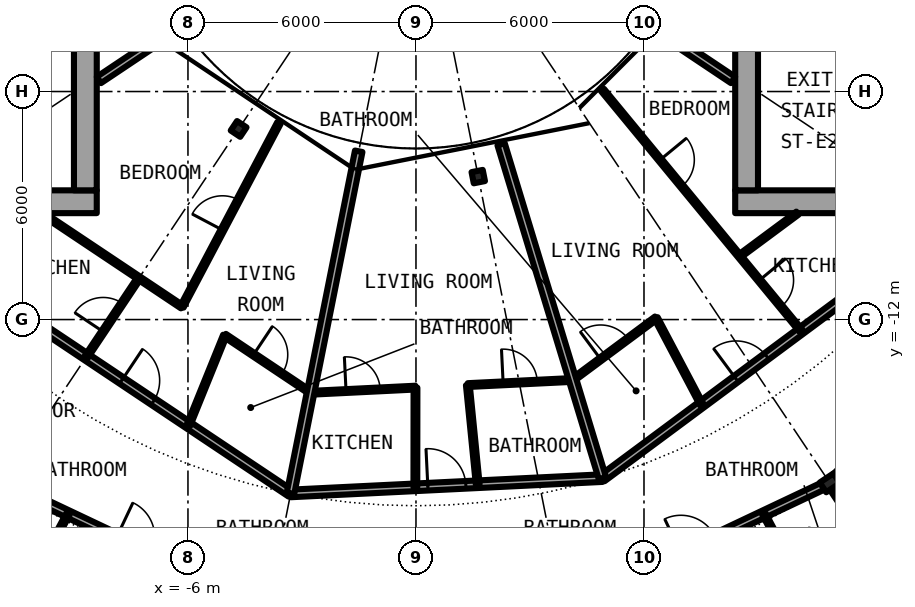
"""IFC4 building model, lengths in metres.
Left out: names, types, materials, properties, quantities, classifications, styles, units other than length and angle.
Written with IfcOpenShell. Run it as: python <this file> out.ifc"""

import sys

from ifc_helpers import new_model, si_unit, direction, frame, frame_2d, origin, origin_2d, place, context, subcontext, project, spatial, rectangle, i_section, extrude, element, fill, save


model = new_model("IFC4")
c1 = context("Model", 3, precision=1e-05, world=origin(), true_north=direction((0.0, 1.0)))
c2 = subcontext(c1, "Body", "Model", "MODEL_VIEW")
j1 = project(units=[si_unit("LENGTHUNIT", "METRE"), si_unit("PLANEANGLEUNIT", "RADIAN")], contexts=[c1])
p1 = place(None, origin())
s1 = spatial("IfcSite", under=j1, at=p1, CompositionType="ELEMENT")
p2 = place(p1, origin())
s2 = spatial("IfcBuilding", under=s1, at=p2, CompositionType="ELEMENT")
p3 = place(p2, frame((0.0, 0.0, 123.85)))
s3 = spatial("IfcBuildingStorey", under=s2, at=p3, CompositionType="ELEMENT", Elevation=123.85)
p4 = place(p3, frame((10.889, -16.297, 0.0), z_axis=(0.0, 0.0, 1.0), x_axis=(0.55557023302, -0.831469612303, 0.0)))
e1 = element("IfcColumn", 1, at=p4, inside=s3, PredefinedType="COLUMN", context=c2, shape_type="SweptSolid", body=[
    extrude(i_section(OverallWidth=0.307, OverallDepth=0.432, WebThickness=0.021, FlangeThickness=0.04, FilletRadius=0.027, at=origin_2d()), origin(), (0.0, 0.0, 1.0), 3.05),
])
for number, where, z_axis, x_axis in (
    (2, (-4.667, -6.984, 0.0), (0.0, 0.0, 1.0), (-0.556, -0.831, 0.0)),
    (3, (1.639, -8.239, 0.0), (0.0, 0.0, 1.0), (0.195, -0.981, 0.0)),
):
    element("IfcColumn", number, at=place(p3, frame(where, z_axis=z_axis, x_axis=x_axis)), inside=s3, PredefinedType="COLUMN", context=c2, shape_type="SweptSolid", body=[
        extrude(i_section(OverallWidth=0.3, OverallDepth=0.3, WebThickness=0.011, FlangeThickness=0.019, FilletRadius=0.027, at=origin_2d()), origin(), (0.0, 0.0, 1.0), 3.05),
    ])
p5 = place(p3, frame((8.4, -8.9, 0.0), z_axis=(0.0, 0.0, 1.0), x_axis=(1.0, 0.0, 0.0)))
e4 = element("IfcWall", 4, at=p5, inside=s3, PredefinedType="SHEAR", context=c2, shape_type="SweptSolid", body=[
    extrude(rectangle(XDim=13.8, YDim=0.6, at=frame_2d((6.9, 0.0))), origin(), (0.0, 0.0, 1.0), 3.05),
])
p6 = place(p5, frame((11.475, 0.0, 0.0)))
e5 = element("IfcOpeningElement", 5, at=p6, cuts=e4, PredefinedType="OPENING", context=c2, shape_type="SweptSolid", body=[
    extrude(rectangle(XDim=1.2, YDim=2.3, at=frame_2d((0.6, 1.15))), frame((0.0, 0.31, 0.0), z_axis=(0.0, -1.0, 0.0), x_axis=(1.0, 0.0, 0.0)), (0.0, 0.0, 1.0), 0.62),
])
p7 = place(p3, frame((8.7, -8.6, 0.0), z_axis=(0.0, 0.0, 1.0), x_axis=(0.0, 1.0, 0.0)))
e6 = element("IfcWall", 6, at=p7, inside=s3, PredefinedType="SHEAR", context=c2, shape_type="SweptSolid", body=[
    extrude(rectangle(XDim=17.2, YDim=0.6, at=frame_2d((8.6, 0.0))), origin(), (0.0, 0.0, 1.0), 3.05),
])
p8 = place(p7, frame((7.4, 0.0, 0.1)))
e7 = element("IfcOpeningElement", 7, at=p8, cuts=e6, PredefinedType="OPENING", context=c2, shape_type="SweptSolid", body=[
    extrude(rectangle(XDim=2.4, YDim=2.2, at=frame_2d((1.2, 1.1))), frame((0.0, 0.31, 0.0), z_axis=(0.0, -1.0, 0.0), x_axis=(1.0, 0.0, 0.0)), (0.0, 0.0, 1.0), 0.62),
])
p9 = place(p3, frame((-22.2, -8.9, 0.0), z_axis=(0.0, 0.0, 1.0), x_axis=(1.0, 0.0, 0.0)))
e8 = element("IfcWall", 8, at=p9, inside=s3, PredefinedType="SHEAR", context=c2, shape_type="SweptSolid", body=[
    extrude(rectangle(XDim=13.8, YDim=0.6, at=frame_2d((6.9, 0.0))), origin(), (0.0, 0.0, 1.0), 3.05),
])
p10 = place(p9, frame((1.125, 0.0, 0.0)))
e9 = element("IfcOpeningElement", 9, at=p10, cuts=e8, PredefinedType="OPENING", context=c2, shape_type="SweptSolid", body=[
    extrude(rectangle(XDim=1.2, YDim=2.3, at=frame_2d((0.6, 1.15))), frame((0.0, 0.31, 0.0), z_axis=(0.0, -1.0, 0.0), x_axis=(1.0, 0.0, 0.0)), (0.0, 0.0, 1.0), 0.62),
])
p11 = place(p3, frame((-8.7, 8.6, 0.0), z_axis=(0.0, 0.0, 1.0), x_axis=(0.0, -1.0, 0.0)))
e10 = element("IfcWall", 10, at=p11, inside=s3, PredefinedType="SHEAR", context=c2, shape_type="SweptSolid", body=[
    extrude(rectangle(XDim=17.2, YDim=0.6, at=frame_2d((8.6, 0.0))), origin(), (0.0, 0.0, 1.0), 3.05),
])
p12 = place(p11, frame((7.4, 0.0, 0.1)))
e11 = element("IfcOpeningElement", 11, at=p12, cuts=e10, PredefinedType="OPENING", context=c2, shape_type="SweptSolid", body=[
    extrude(rectangle(XDim=2.4, YDim=2.2, at=frame_2d((1.2, 1.1))), frame((0.0, 0.31, 0.0), z_axis=(0.0, -1.0, 0.0), x_axis=(1.0, 0.0, 0.0)), (0.0, 0.0, 1.0), 0.62),
])
p13 = place(p3, frame((-10.749, -16.363, 0.0), z_axis=(0.0, 0.0, 1.0), x_axis=(0.903968655954, -0.427598724335, 0.0)))
e12 = element("IfcWall", 12, at=p13, inside=s3, PredefinedType="PARTITIONING", context=c2, shape_type="SweptSolid", body=[
    extrude(rectangle(XDim=5.596, YDim=0.2, at=frame_2d((2.798, 0.0))), origin(), (0.0, 0.0, 1.0), 2.39),
])
p14 = place(p13, frame((3.179, 0.0, 0.0)))
e13 = element("IfcOpeningElement", 13, at=p14, cuts=e12, PredefinedType="OPENING", context=c2, shape_type="SweptSolid", body=[
    extrude(rectangle(XDim=1.0, YDim=2.3, at=frame_2d((0.5, 1.15))), frame((0.0, 0.11, 0.0), z_axis=(0.0, -1.0, 0.0), x_axis=(1.0, 0.0, 0.0)), (0.0, 0.0, 1.0), 0.22),
])
p15 = place(p3, frame((5.69, -18.756, 0.0), z_axis=(0.0, 0.0, 1.0), x_axis=(0.903968655954, 0.427598724335, 0.0)))
e14 = element("IfcWall", 14, at=p15, inside=s3, PredefinedType="PARTITIONING", context=c2, shape_type="SweptSolid", body=[
    extrude(rectangle(XDim=5.596, YDim=0.2, at=frame_2d((2.798, 0.0))), origin(), (0.0, 0.0, 1.0), 2.39),
])
p16 = place(p15, frame((1.418, 0.0, 0.0)))
e15 = element("IfcOpeningElement", 15, at=p16, cuts=e14, PredefinedType="OPENING", context=c2, shape_type="SweptSolid", body=[
    extrude(rectangle(XDim=1.0, YDim=2.3, at=frame_2d((0.5, 1.15))), frame((0.0, 0.11, 0.0), z_axis=(0.0, -1.0, 0.0), x_axis=(1.0, 0.0, 0.0)), (0.0, 0.0, 1.0), 0.22),
])
p17 = place(p3, frame((11.0, -16.186, 0.0), z_axis=(0.0, 0.0, 1.0), x_axis=(0.707106781187, 0.707106781187, 0.0)))
e16 = element("IfcWall", 16, at=p17, inside=s3, PredefinedType="PARTITIONING", context=c2, shape_type="SweptSolid", body=[
    extrude(rectangle(XDim=7.334, YDim=0.2, at=frame_2d((3.667, 0.0))), origin(), (0.0, 0.0, 1.0), 2.39),
])
p18 = place(p17, frame((4.123, 0.0, 0.0)))
e17 = element("IfcOpeningElement", 17, at=p18, cuts=e16, PredefinedType="OPENING", context=c2, shape_type="SweptSolid", body=[
    extrude(rectangle(XDim=1.0, YDim=2.3, at=frame_2d((0.5, 1.15))), frame((0.0, 0.11, 0.0), z_axis=(0.0, -1.0, 0.0), x_axis=(1.0, 0.0, 0.0)), (0.0, 0.0, 1.0), 0.22),
])
p19 = place(p3, frame((-3.297, -16.575, 0.0), z_axis=(0.0, 0.0, 1.0), x_axis=(0.998796706656, 0.0490422142, 0.0)))
e18 = element("IfcWall", 18, at=p19, inside=s3, PredefinedType="PARTITIONING", context=c2, shape_type="SweptSolid", body=[
    extrude(rectangle(XDim=8.214, YDim=0.2, at=frame_2d((4.107, 0.0))), origin(), (0.0, 0.0, 1.0), 2.7),
])
p20 = place(p19, frame((3.614, 0.0, 0.0)))
e19 = element("IfcOpeningElement", 19, at=p20, cuts=e18, PredefinedType="OPENING", context=c2, shape_type="SweptSolid", body=[
    extrude(rectangle(XDim=1.0, YDim=2.3, at=frame_2d((0.5, 1.15))), frame((0.0, 0.11, 0.0), z_axis=(0.0, -1.0, 0.0), x_axis=(1.0, 0.0, 0.0)), (0.0, 0.0, 1.0), 0.22),
])
p21 = place(p3, frame((4.906, -16.172, 0.0), z_axis=(0.0, 0.0, 1.0), x_axis=(0.803191461888, 0.595720971219, 0.0)))
e20 = element("IfcWall", 20, at=p21, inside=s3, PredefinedType="PARTITIONING", context=c2, shape_type="SweptSolid", body=[
    extrude(rectangle(XDim=9.76, YDim=0.2, at=frame_2d((4.88, 0.0))), origin(), (0.0, 0.0, 1.0), 2.7),
])
p22 = place(p21, frame((4.38, 0.0, 0.0)))
e21 = element("IfcOpeningElement", 21, at=p22, cuts=e20, PredefinedType="OPENING", context=c2, shape_type="SweptSolid", body=[
    extrude(rectangle(XDim=1.0, YDim=2.3, at=frame_2d((0.5, 1.15))), frame((0.0, 0.11, 0.0), z_axis=(0.0, -1.0, 0.0), x_axis=(1.0, 0.0, 0.0)), (0.0, 0.0, 1.0), 0.22),
])
p23 = place(p3, frame((-12.706, -10.291, 0.0), z_axis=(0.0, 0.0, 1.0), x_axis=(0.831588572532, -0.555392155178, 0.0)))
e22 = element("IfcWall", 22, at=p23, inside=s3, PredefinedType="PARTITIONING", context=c2, shape_type="SweptSolid", body=[
    extrude(rectangle(XDim=11.314, YDim=0.2, at=frame_2d((5.657, 0.0))), origin(), (0.0, 0.0, 1.0), 2.7),
])
p24 = place(p23, frame((5.966, 0.0, 0.0)))
e23 = element("IfcOpeningElement", 23, at=p24, cuts=e22, PredefinedType="OPENING", context=c2, shape_type="SweptSolid", body=[
    extrude(rectangle(XDim=1.0, YDim=2.3, at=frame_2d((0.5, 1.15))), frame((0.0, 0.11, 0.0), z_axis=(0.0, -1.0, 0.0), x_axis=(1.0, 0.0, 0.0)), (0.0, 0.0, 1.0), 0.22),
])
p25 = place(p3, frame((-2.772, -13.927, 0.0), z_axis=(0.0, 0.0, 1.0), x_axis=(0.998787571158, 0.04922791586, 0.0)))
e24 = element("IfcWall", 24, at=p25, inside=s3, PredefinedType="PARTITIONING", context=c2, shape_type="SweptSolid", body=[
    extrude(rectangle(XDim=2.762, YDim=0.1, at=frame_2d((1.381, 0.0))), origin(), (0.0, 0.0, 1.0), 2.7),
])
p26 = place(p25, frame((0.933, 0.0, 0.0)))
e25 = element("IfcOpeningElement", 25, at=p26, cuts=e24, PredefinedType="OPENING", context=c2, shape_type="SweptSolid", body=[
    extrude(rectangle(XDim=0.9, YDim=2.3, at=frame_2d((0.45, 1.15))), frame((0.0, 0.06, 0.0), z_axis=(0.0, -1.0, 0.0), x_axis=(1.0, 0.0, 0.0)), (0.0, 0.0, 1.0), 0.12),
])
p27 = place(p3, frame((1.365, -13.724, 0.0), z_axis=(0.0, 0.0, 1.0), x_axis=(0.99880320044, 0.048909782152, 0.0)))
e26 = element("IfcWall", 26, at=p27, inside=s3, PredefinedType="PARTITIONING", context=c2, shape_type="SweptSolid", body=[
    extrude(rectangle(XDim=2.76, YDim=0.1, at=frame_2d((1.38, 0.0))), origin(), (0.0, 0.0, 1.0), 2.7),
])
p28 = place(p27, frame((0.93, 0.0, 0.0)))
e27 = element("IfcOpeningElement", 27, at=p28, cuts=e26, PredefinedType="OPENING", context=c2, shape_type="SweptSolid", body=[
    extrude(rectangle(XDim=0.9, YDim=2.3, at=frame_2d((0.45, 1.15))), frame((0.0, 0.06, 0.0), z_axis=(0.0, -1.0, 0.0), x_axis=(1.0, 0.0, 0.0)), (0.0, 0.0, 1.0), 0.12),
])
p29 = place(p3, frame((4.122, -13.589, 0.0), z_axis=(0.0, 0.0, 1.0), x_axis=(0.803128348509, 0.595806055542, 0.0)))
e28 = element("IfcWall", 28, at=p29, inside=s3, PredefinedType="PARTITIONING", context=c2, shape_type="SweptSolid", body=[
    extrude(rectangle(XDim=2.734, YDim=0.1, at=frame_2d((1.367, 0.0))), origin(), (0.0, 0.0, 1.0), 2.7),
])
p30 = place(p29, frame((0.917, 0.0, 0.0)))
e29 = element("IfcOpeningElement", 29, at=p30, cuts=e28, PredefinedType="OPENING", context=c2, shape_type="SweptSolid", body=[
    extrude(rectangle(XDim=0.9, YDim=2.3, at=frame_2d((0.45, 1.15))), frame((0.0, 0.06, 0.0), z_axis=(0.0, -1.0, 0.0), x_axis=(1.0, 0.0, 0.0)), (0.0, 0.0, 1.0), 0.12),
])
p31 = place(p3, frame((8.513, -10.332, 0.0), z_axis=(0.0, 0.0, 1.0), x_axis=(0.803149591038, 0.595777420196, 0.0)))
e30 = element("IfcWall", 30, at=p31, inside=s3, PredefinedType="PARTITIONING", context=c2, shape_type="SweptSolid", body=[
    extrude(rectangle(XDim=1.9, YDim=0.1, at=frame_2d((0.95, 0.0))), origin(), (0.0, 0.0, 1.0), 2.7),
])
p32 = place(p3, frame((-9.844, -9.202, 0.0), z_axis=(0.0, 0.0, 1.0), x_axis=(0.831617979783, -0.555348121183, 0.0)))
e31 = element("IfcWall", 31, at=p32, inside=s3, PredefinedType="PARTITIONING", context=c2, shape_type="SweptSolid", body=[
    extrude(rectangle(XDim=4.434, YDim=0.1, at=frame_2d((2.217, 0.0))), origin(), (0.0, 0.0, 1.0), 2.7),
])
p33 = place(p3, frame((-5.029, -12.418, 0.0), z_axis=(0.0, 0.0, 1.0), x_axis=(0.831538390496, -0.555467285384, 0.0)))
e32 = element("IfcWall", 32, at=p33, inside=s3, PredefinedType="PARTITIONING", context=c2, shape_type="SweptSolid", body=[
    extrude(rectangle(XDim=2.717, YDim=0.1, at=frame_2d((1.358, 0.0))), origin(), (0.0, 0.0, 1.0), 2.7),
])
p34 = place(p33, frame((0.908, 0.0, 0.0)))
e33 = element("IfcOpeningElement", 33, at=p34, cuts=e32, PredefinedType="OPENING", context=c2, shape_type="SweptSolid", body=[
    extrude(rectangle(XDim=0.9, YDim=2.3, at=frame_2d((0.45, 1.15))), frame((0.0, 0.06, 0.0), z_axis=(0.0, -1.0, 0.0), x_axis=(1.0, 0.0, 0.0)), (0.0, 0.0, 1.0), 0.12),
])
for number, where, z_axis, x_axis in (
    (34, (-6.513, -4.472, 0.0), (0.0, 0.0, 1.0), (-0.831, -0.556, 0.0)),
    (35, (6.513, -4.472, 0.0), (0.0, 0.0, 1.0), (0.831, -0.556, 0.0)),
):
    element("IfcWall", number, at=place(p3, frame(where, z_axis=z_axis, x_axis=x_axis)), inside=s3, PredefinedType="PARTITIONING", context=c2, shape_type="SweptSolid", body=[
        extrude(rectangle(XDim=2.203, YDim=0.2, at=frame_2d((1.101, 0.0))), origin(), (0.0, 0.0, 1.0), 2.7),
    ])
p35 = place(p3, frame((-10.417, -19.474, 0.0), z_axis=(0.0, 0.0, 1.0), x_axis=(0.471701791767, 0.881758141241, 0.0)))
e36 = element("IfcWall", 36, at=p35, inside=s3, PredefinedType="PARTITIONING", context=c2, shape_type="SweptSolid", body=[
    extrude(rectangle(XDim=2.673, YDim=0.1, at=frame_2d((1.337, 0.0))), origin(), (0.0, 0.0, 1.0), 2.7),
])
p36 = place(p35, frame((0.887, 0.0, 0.0)))
e37 = element("IfcOpeningElement", 37, at=p36, cuts=e36, PredefinedType="OPENING", context=c2, shape_type="SweptSolid", body=[
    extrude(rectangle(XDim=0.9, YDim=2.3, at=frame_2d((0.45, 1.15))), frame((0.0, 0.06, 0.0), z_axis=(0.0, -1.0, 0.0), x_axis=(1.0, 0.0, 0.0)), (0.0, 0.0, 1.0), 0.12),
])
p37 = place(p3, frame((-8.675, -12.982, 0.0), z_axis=(0.0, 0.0, 1.0), x_axis=(0.555625883274, 0.831432425297, 0.0)))
e38 = element("IfcWall", 38, at=p37, inside=s3, PredefinedType="PARTITIONING", context=c2, shape_type="SweptSolid", body=[
    extrude(rectangle(XDim=2.494, YDim=0.1, at=frame_2d((1.247, 0.0))), origin(), (0.0, 0.0, 1.0), 2.7),
])
p38 = place(p37, frame((0.798, 0.0, 0.0)))
e39 = element("IfcOpeningElement", 39, at=p38, cuts=e38, PredefinedType="OPENING", context=c2, shape_type="SweptSolid", body=[
    extrude(rectangle(XDim=0.9, YDim=2.3, at=frame_2d((0.45, 1.15))), frame((0.0, 0.06, 0.0), z_axis=(0.0, -1.0, 0.0), x_axis=(1.0, 0.0, 0.0)), (0.0, 0.0, 1.0), 0.12),
])
p39 = place(p3, frame((-6.159, -11.663, 0.0), z_axis=(0.0, 0.0, 1.0), x_axis=(0.466976820365, 0.884269556889, 0.0)))
e40 = element("IfcWall", 40, at=p39, inside=s3, PredefinedType="PARTITIONING", context=c2, shape_type="SweptSolid", body=[
    extrude(rectangle(XDim=5.469, YDim=0.1, at=frame_2d((2.735, 0.0))), origin(), (0.0, 0.0, 1.0), 2.7),
])
p40 = place(p39, frame((2.284, 0.0, 0.0)))
e41 = element("IfcOpeningElement", 41, at=p40, cuts=e40, PredefinedType="OPENING", context=c2, shape_type="SweptSolid", body=[
    extrude(rectangle(XDim=0.9, YDim=2.3, at=frame_2d((0.45, 1.15))), frame((0.0, 0.06, 0.0), z_axis=(0.0, -1.0, 0.0), x_axis=(1.0, 0.0, 0.0)), (0.0, 0.0, 1.0), 0.12),
])
p41 = place(p3, frame((-5.986, -14.779, 0.0), z_axis=(0.0, 0.0, 1.0), x_axis=(0.375649498413, 0.926761811008, 0.0)))
e42 = element("IfcWall", 42, at=p41, inside=s3, PredefinedType="PARTITIONING", context=c2, shape_type="SweptSolid", body=[
    extrude(rectangle(XDim=2.548, YDim=0.1, at=frame_2d((1.274, 0.0))), origin(), (0.0, 0.0, 1.0), 2.7),
])
p42 = place(p3, frame((-3.302, -16.574, 0.0), z_axis=(0.0, 0.0, 1.0), x_axis=(0.195543237077, 0.980695081273, 0.0)))
e43 = element("IfcWall", 43, at=p42, inside=s3, PredefinedType="PARTITIONING", context=c2, shape_type="SweptSolid", body=[
    extrude(rectangle(XDim=9.179, YDim=0.2, at=frame_2d((4.59, 0.0))), origin(), (0.0, 0.0, 1.0), 2.7),
])
p43 = place(p3, frame((-0.016, -16.414, 0.0), z_axis=(0.0, 0.0, 1.0), x_axis=(0.001210427419, 0.999999267432, 0.0)))
e44 = element("IfcWall", 44, at=p43, inside=s3, PredefinedType="PARTITIONING", context=c2, shape_type="SweptSolid", body=[
    extrude(rectangle(XDim=2.622, YDim=0.1, at=frame_2d((1.311, 0.0))), origin(), (0.0, 0.0, 1.0), 2.7),
])
p44 = place(p3, frame((1.365, -13.724, 0.0), z_axis=(0.0, 0.0, 1.0), x_axis=(0.099171803948, -0.995070325807, 0.0)))
e45 = element("IfcWall", 45, at=p44, inside=s3, PredefinedType="PARTITIONING", context=c2, shape_type="SweptSolid", body=[
    extrude(rectangle(XDim=2.622, YDim=0.1, at=frame_2d((1.311, 0.0))), origin(), (0.0, 0.0, 1.0), 2.7),
])
p45 = place(p3, frame((2.24, -7.388, 0.0), z_axis=(0.0, 0.0, 1.0), x_axis=(0.290420725025, -0.956899055531, 0.0)))
e46 = element("IfcWall", 46, at=p45, inside=s3, PredefinedType="PARTITIONING", context=c2, shape_type="SweptSolid", body=[
    extrude(rectangle(XDim=9.18, YDim=0.2, at=frame_2d((4.59, 0.0))), origin(), (0.0, 0.0, 1.0), 2.7),
])
p46 = place(p3, frame((4.908, -5.959, 0.0), z_axis=(0.0, 0.0, 1.0), x_axis=(0.636105207978, -0.771602335652, 0.0)))
e47 = element("IfcWall", 47, at=p46, inside=s3, PredefinedType="PARTITIONING", context=c2, shape_type="SweptSolid", body=[
    extrude(rectangle(XDim=8.213, YDim=0.1, at=frame_2d((4.106, 0.0))), origin(), (0.0, 0.0, 1.0), 2.7),
])
p47 = place(p46, frame((6.49, 0.0, 0.0)))
e48 = element("IfcOpeningElement", 48, at=p47, cuts=e47, PredefinedType="OPENING", context=c2, shape_type="SweptSolid", body=[
    extrude(rectangle(XDim=0.9, YDim=2.3, at=frame_2d((0.45, 1.15))), frame((0.0, 0.06, 0.0), z_axis=(0.0, -1.0, 0.0), x_axis=(1.0, 0.0, 0.0)), (0.0, 0.0, 1.0), 0.12),
])
p48 = place(p46, frame((2.384, 0.0, 0.0)))
e49 = element("IfcOpeningElement", 49, at=p48, cuts=e47, PredefinedType="OPENING", context=c2, shape_type="SweptSolid", body=[
    extrude(rectangle(XDim=0.9, YDim=2.3, at=frame_2d((0.45, 1.15))), frame((0.0, 0.06, 0.0), z_axis=(0.0, -1.0, 0.0), x_axis=(1.0, 0.0, 0.0)), (0.0, 0.0, 1.0), 0.12),
])
p49 = place(p3, frame((6.316, -11.961, 0.0), z_axis=(0.0, 0.0, 1.0), x_axis=(0.467037016128, -0.884237765291, 0.0)))
e50 = element("IfcWall", 50, at=p49, inside=s3, PredefinedType="PARTITIONING", context=c2, shape_type="SweptSolid", body=[
    extrude(rectangle(XDim=2.572, YDim=0.1, at=frame_2d((1.286, 0.0))), origin(), (0.0, 0.0, 1.0), 2.7),
])
p50 = place(p3, frame((9.156, -17.117, 0.0), z_axis=(0.0, 0.0, 1.0), x_axis=(0.471701791767, -0.881758141241, 0.0)))
e51 = element("IfcWall", 51, at=p50, inside=s3, PredefinedType="PARTITIONING", context=c2, shape_type="SweptSolid", body=[
    extrude(rectangle(XDim=2.673, YDim=0.1, at=frame_2d((1.337, 0.0))), origin(), (0.0, 0.0, 1.0), 2.7),
])
p51 = place(p50, frame((0.887, 0.0, 0.0)))
e52 = element("IfcOpeningElement", 52, at=p51, cuts=e51, PredefinedType="OPENING", context=c2, shape_type="SweptSolid", body=[
    extrude(rectangle(XDim=0.9, YDim=2.3, at=frame_2d((0.45, 1.15))), frame((0.0, 0.06, 0.0), z_axis=(0.0, -1.0, 0.0), x_axis=(1.0, 0.0, 0.0)), (0.0, 0.0, 1.0), 0.12),
])
p52 = place(p3, frame((11.009, -16.477, 0.0), z_axis=(0.0, 0.0, 1.0), x_axis=(0.555664536482, -0.831406593008, 0.0)))
e53 = element("IfcWall", 53, at=p52, inside=s3, PredefinedType="PARTITIONING", context=c2, shape_type="SweptSolid", body=[
    extrude(rectangle(XDim=7.358, YDim=0.2, at=frame_2d((3.679, 0.0))), origin(), (0.0, 0.0, 1.0), 2.7),
])
p53 = place(p24, origin())
e54 = element("IfcDoor", 54, at=p53, inside=s3, OperationType="SINGLE_SWING_RIGHT", PredefinedType="DOOR", context=c2, shape_type="SweptSolid", body=[
    extrude(rectangle(XDim=1.0, YDim=2.3, at=frame_2d((0.5, 1.15))), frame((0.0, 0.025, 0.0), z_axis=(0.0, -1.0, 0.0), x_axis=(1.0, 0.0, 0.0)), (0.0, 0.0, 1.0), 0.05),
])
fill(e23, e54)
p54 = place(p34, origin())
e55 = element("IfcDoor", 55, at=p54, inside=s3, OperationType="SINGLE_SWING_LEFT", PredefinedType="DOOR", context=c2, shape_type="SweptSolid", body=[
    extrude(rectangle(XDim=0.9, YDim=2.3, at=frame_2d((0.45, 1.15))), frame((0.0, 0.025, 0.0), z_axis=(0.0, -1.0, 0.0), x_axis=(1.0, 0.0, 0.0)), (0.0, 0.0, 1.0), 0.05),
])
fill(e33, e55)
p55 = place(p38, origin())
e56 = element("IfcDoor", 56, at=p55, inside=s3, OperationType="SINGLE_SWING_RIGHT", PredefinedType="DOOR", context=c2, shape_type="SweptSolid", body=[
    extrude(rectangle(XDim=0.9, YDim=2.3, at=frame_2d((0.45, 1.15))), frame((0.0, 0.025, 0.0), z_axis=(0.0, -1.0, 0.0), x_axis=(1.0, 0.0, 0.0)), (0.0, 0.0, 1.0), 0.05),
])
fill(e39, e56)
p56 = place(p40, origin())
e57 = element("IfcDoor", 57, at=p56, inside=s3, OperationType="SINGLE_SWING_LEFT", PredefinedType="DOOR", context=c2, shape_type="SweptSolid", body=[
    extrude(rectangle(XDim=0.9, YDim=2.3, at=frame_2d((0.45, 1.15))), frame((0.0, 0.025, 0.0), z_axis=(0.0, -1.0, 0.0), x_axis=(1.0, 0.0, 0.0)), (0.0, 0.0, 1.0), 0.05),
])
fill(e41, e57)
p57 = place(p20, origin())
e58 = element("IfcDoor", 58, at=p57, inside=s3, OperationType="SINGLE_SWING_RIGHT", PredefinedType="DOOR", context=c2, shape_type="SweptSolid", body=[
    extrude(rectangle(XDim=1.0, YDim=2.3, at=frame_2d((0.5, 1.15))), frame((0.0, 0.025, 0.0), z_axis=(0.0, -1.0, 0.0), x_axis=(1.0, 0.0, 0.0)), (0.0, 0.0, 1.0), 0.05),
])
fill(e19, e58)
p58 = place(p28, origin())
e59 = element("IfcDoor", 59, at=p58, inside=s3, OperationType="SINGLE_SWING_RIGHT", PredefinedType="DOOR", context=c2, shape_type="SweptSolid", body=[
    extrude(rectangle(XDim=0.9, YDim=2.3, at=frame_2d((0.45, 1.15))), frame((0.0, 0.025, 0.0), z_axis=(0.0, -1.0, 0.0), x_axis=(1.0, 0.0, 0.0)), (0.0, 0.0, 1.0), 0.05),
])
fill(e27, e59)
p59 = place(p26, origin())
e60 = element("IfcDoor", 60, at=p59, inside=s3, OperationType="SINGLE_SWING_RIGHT", PredefinedType="DOOR", context=c2, shape_type="SweptSolid", body=[
    extrude(rectangle(XDim=0.9, YDim=2.3, at=frame_2d((0.45, 1.15))), frame((0.0, 0.025, 0.0), z_axis=(0.0, -1.0, 0.0), x_axis=(1.0, 0.0, 0.0)), (0.0, 0.0, 1.0), 0.05),
])
fill(e25, e60)
p60 = place(p22, origin())
e61 = element("IfcDoor", 61, at=p60, inside=s3, OperationType="SINGLE_SWING_LEFT", PredefinedType="DOOR", context=c2, shape_type="SweptSolid", body=[
    extrude(rectangle(XDim=1.0, YDim=2.3, at=frame_2d((0.5, 1.15))), frame((0.0, 0.025, 0.0), z_axis=(0.0, -1.0, 0.0), x_axis=(1.0, 0.0, 0.0)), (0.0, 0.0, 1.0), 0.05),
])
fill(e21, e61)
p61 = place(p30, origin())
e62 = element("IfcDoor", 62, at=p61, inside=s3, OperationType="SINGLE_SWING_RIGHT", PredefinedType="DOOR", context=c2, shape_type="SweptSolid", body=[
    extrude(rectangle(XDim=0.9, YDim=2.3, at=frame_2d((0.45, 1.15))), frame((0.0, 0.025, 0.0), z_axis=(0.0, -1.0, 0.0), x_axis=(1.0, 0.0, 0.0)), (0.0, 0.0, 1.0), 0.05),
])
fill(e29, e62)
p62 = place(p47, origin())
e63 = element("IfcDoor", 63, at=p62, inside=s3, OperationType="SINGLE_SWING_RIGHT", PredefinedType="DOOR", context=c2, shape_type="SweptSolid", body=[
    extrude(rectangle(XDim=0.9, YDim=2.3, at=frame_2d((0.45, 1.15))), frame((0.0, 0.025, 0.0), z_axis=(0.0, -1.0, 0.0), x_axis=(1.0, 0.0, 0.0)), (0.0, 0.0, 1.0), 0.05),
])
fill(e48, e63)
p63 = place(p48, origin())
e64 = element("IfcDoor", 64, at=p63, inside=s3, OperationType="SINGLE_SWING_LEFT", PredefinedType="DOOR", context=c2, shape_type="SweptSolid", body=[
    extrude(rectangle(XDim=0.9, YDim=2.3, at=frame_2d((0.45, 1.15))), frame((0.0, 0.025, 0.0), z_axis=(0.0, -1.0, 0.0), x_axis=(1.0, 0.0, 0.0)), (0.0, 0.0, 1.0), 0.05),
])
fill(e49, e64)
save(model, sys.argv[1])
